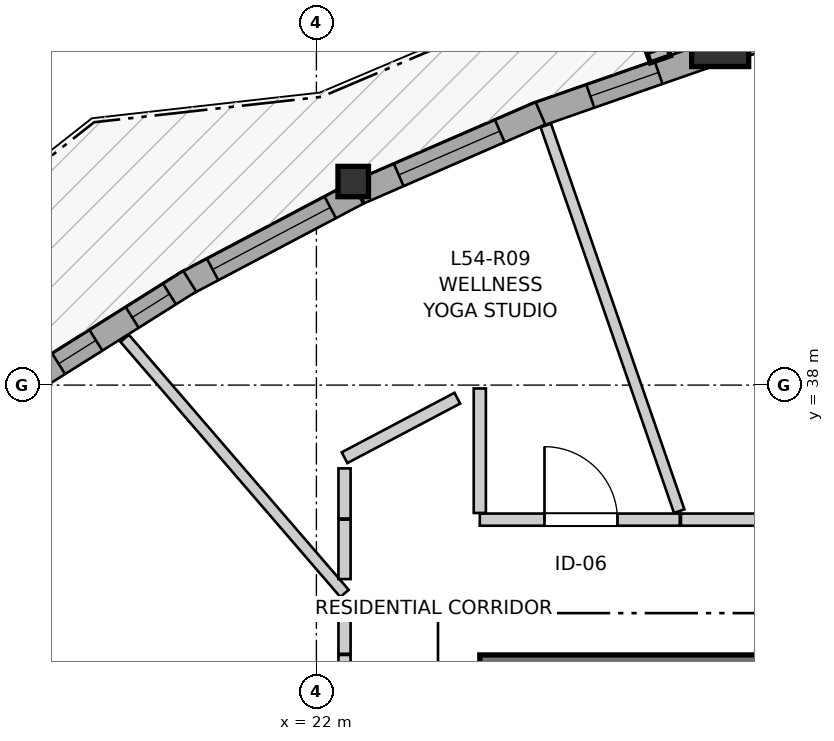
"""IFC4 building model, lengths in metres.
Left out: names, types, materials, properties, quantities, classifications, styles, units other than length and angle.
Written with IfcOpenShell. Run it as: python <this file> out.ifc"""

import sys

from ifc_helpers import new_model, si_unit, direction, frame, frame_2d, origin, origin_2d, place, context, subcontext, project, spatial, rectangle, i_section, extrude, source, transform, mapped, element, fill, save


model = new_model("IFC4")
c1 = context("Model", 3, precision=1e-05, world=origin(), true_north=direction((0.0, 1.0)))
c2 = subcontext(c1, "Body", "Model", "MODEL_VIEW")
j1 = project(units=[si_unit("LENGTHUNIT", "METRE"), si_unit("PLANEANGLEUNIT", "RADIAN")], contexts=[c1])
p1 = place(None, origin())
s1 = spatial("IfcSite", under=j1, at=p1, CompositionType="ELEMENT")
p2 = place(p1, origin())
s2 = spatial("IfcBuilding", under=s1, at=p2, CompositionType="ELEMENT")
p3 = place(p2, frame((0.0, 0.0, 181.0)))
s3 = spatial("IfcBuildingStorey", under=s2, at=p3, CompositionType="ELEMENT", Elevation=181.0)
p4 = place(p3, frame((36.55, 34.125, 0.0), z_axis=(0.0, 0.0, 1.0), x_axis=(-1.0, 0.0, 0.0)))
e1 = element("IfcWall", 1, at=p4, inside=s3, PredefinedType="SHEAR", context=c2, shape_type="SweptSolid", body=[
    extrude(rectangle(XDim=12.4, YDim=0.65, at=frame_2d((6.2, 0.0))), origin(), (0.0, 0.0, 1.0), 2.95),
])
m1 = source(origin(), c2, "Body", "SweptSolid", [
    extrude(rectangle(XDim=0.75, YDim=0.75, at=origin_2d()), origin(), (0.0, 0.0, 1.0), 2.95),
])
p5 = place(p3, frame((27.312, 42.566, 0.0), z_axis=(0.0, 0.0, 1.0), x_axis=(1.0, 0.0, 0.0)))
e2 = element("IfcColumn", 2, at=p5, inside=s3, PredefinedType="COLUMN", context=c2, shape_type="MappedRepresentation", body=[
    mapped(m1, transform((0.0, 0.0, 0.0), x_axis=(1.0, 0.0, 0.0), y_axis=(0.0, 1.0, 0.0), z_axis=(0.0, 0.0, 1.0), scale=1.0)),
])
m2 = source(origin(), c2, "Body", "SweptSolid", [
    extrude(i_section(OverallWidth=0.401, OverallDepth=0.399, WebThickness=0.023, FlangeThickness=0.036, FilletRadius=0.015, at=origin_2d()), origin(), (0.0, 0.0, 1.0), 2.95),
])
p6 = place(p3, frame((22.484, 40.678, 0.0), z_axis=(0.0, 0.0, 1.0), x_axis=(1.0, 0.0, 0.0)))
e3 = element("IfcColumn", 3, at=p6, inside=s3, PredefinedType="PILASTER", context=c2, shape_type="MappedRepresentation", body=[
    mapped(m2, transform((0.0, 0.0, 0.0), x_axis=(1.0, 0.0, 0.0), y_axis=(0.0, 1.0, 0.0), z_axis=(0.0, 0.0, 1.0), scale=1.0)),
])
p7 = place(p3, frame((29.95, 43.112, 0.0), z_axis=(0.0, 0.0, 1.0), x_axis=(-0.96543906005, -0.260628895806, 0.0)))
e4 = element("IfcWall", 4, at=p7, inside=s3, PredefinedType="SOLIDWALL", context=c2, shape_type="SweptSolid", body=[
    extrude(rectangle(XDim=2.524, YDim=0.32, at=frame_2d((1.262, 0.0))), origin(), (0.0, 0.0, 1.0), 2.53),
])
p8 = place(p7, frame((0.767, 0.0, 0.0)))
e5 = element("IfcOpeningElement", 5, at=p8, cuts=e4, PredefinedType="OPENING", context=c2, shape_type="SweptSolid", body=[
    extrude(rectangle(XDim=1.0, YDim=2.1, at=frame_2d((0.5, 1.05))), frame((0.0, 0.17, 0.0), z_axis=(0.0, -1.0, 0.0), x_axis=(1.0, 0.0, 0.0)), (0.0, 0.0, 1.0), 0.34),
])
p9 = place(p3, frame((27.209, 42.361, 0.0), z_axis=(0.0, 0.0, 1.0), x_axis=(-0.944111191945, -0.329627148829, 0.0)))
e6 = element("IfcWall", 6, at=p9, inside=s3, PredefinedType="SOLIDWALL", context=c2, shape_type="SweptSolid", body=[
    extrude(rectangle(XDim=2.481, YDim=0.32, at=frame_2d((1.241, 0.0))), origin(), (0.0, 0.0, 1.0), 2.53),
])
p10 = place(p9, frame((0.75, 0.0, 0.82)))
e7 = element("IfcOpeningElement", 7, at=p10, cuts=e6, PredefinedType="OPENING", context=c2, shape_type="SweptSolid", body=[
    extrude(rectangle(XDim=0.95, YDim=1.35, at=frame_2d((0.475, 0.675))), frame((0.0, 0.17, 0.0), z_axis=(0.0, -1.0, 0.0), x_axis=(1.0, 0.0, 0.0)), (0.0, 0.0, 1.0), 0.34),
])
p11 = place(p3, frame((24.948, 41.575, 0.0), z_axis=(0.0, 0.0, 1.0), x_axis=(-0.917095460669, -0.398667676168, 0.0)))
e8 = element("IfcWall", 8, at=p11, inside=s3, PredefinedType="SOLIDWALL", context=c2, shape_type="SweptSolid", body=[
    extrude(rectangle(XDim=2.597, YDim=0.32, at=frame_2d((1.299, 0.0))), origin(), (0.0, 0.0, 1.0), 2.53),
])
p12 = place(p11, frame((0.583, 0.0, 0.82)))
e9 = element("IfcOpeningElement", 9, at=p12, cuts=e8, PredefinedType="OPENING", context=c2, shape_type="SweptSolid", body=[
    extrude(rectangle(XDim=1.45, YDim=1.25, at=frame_2d((0.725, 0.625))), frame((0.0, 0.17, 0.0), z_axis=(0.0, -1.0, 0.0), x_axis=(1.0, 0.0, 0.0)), (0.0, 0.0, 1.0), 0.34),
])
p13 = place(p3, frame((22.542, 40.527, 0.0), z_axis=(0.0, 0.0, 1.0), x_axis=(-0.884378248125, -0.466770944087, 0.0)))
e10 = element("IfcWall", 10, at=p13, inside=s3, PredefinedType="SOLIDWALL", context=c2, shape_type="SweptSolid", body=[
    extrude(rectangle(XDim=2.582, YDim=0.32, at=frame_2d((1.291, 0.0))), origin(), (0.0, 0.0, 1.0), 2.53),
])
p14 = place(p13, frame((0.406, 0.0, 0.82)))
e11 = element("IfcOpeningElement", 11, at=p14, cuts=e10, PredefinedType="OPENING", context=c2, shape_type="SweptSolid", body=[
    extrude(rectangle(XDim=1.75, YDim=1.3, at=frame_2d((0.875, 0.65))), frame((0.0, 0.17, 0.0), z_axis=(0.0, -1.0, 0.0), x_axis=(1.0, 0.0, 0.0)), (0.0, 0.0, 1.0), 0.34),
])
p15 = place(p3, frame((20.334, 39.366, 0.0), z_axis=(0.0, 0.0, 1.0), x_axis=(-0.84643016858, -0.532499736825, 0.0)))
e12 = element("IfcWall", 12, at=p15, inside=s3, PredefinedType="SOLIDWALL", context=c2, shape_type="SweptSolid", body=[
    extrude(rectangle(XDim=2.437, YDim=0.32, at=frame_2d((1.219, 0.0))), origin(), (0.0, 0.0, 1.0), 2.53),
])
p16 = place(p15, frame((0.315, 0.0, 0.82)))
e13 = element("IfcOpeningElement", 13, at=p16, cuts=e12, PredefinedType="OPENING", context=c2, shape_type="SweptSolid", body=[
    extrude(rectangle(XDim=0.58, YDim=1.35, at=frame_2d((0.29, 0.675))), frame((0.0, 0.17, 0.0), z_axis=(0.0, -1.0, 0.0), x_axis=(1.0, 0.0, 0.0)), (0.0, 0.0, 1.0), 0.34),
])
p17 = place(p15, frame((1.458, 0.0, 0.82)))
e14 = element("IfcOpeningElement", 14, at=p17, cuts=e12, PredefinedType="OPENING", context=c2, shape_type="SweptSolid", body=[
    extrude(rectangle(XDim=0.58, YDim=1.35, at=frame_2d((0.29, 0.675))), frame((0.0, 0.17, 0.0), z_axis=(0.0, -1.0, 0.0), x_axis=(1.0, 0.0, 0.0)), (0.0, 0.0, 1.0), 0.34),
])
p18 = place(p3, frame((22.37, 27.85, 0.0), z_axis=(0.0, 0.0, 1.0), x_axis=(0.0, 1.0, 0.0)))
e15 = element("IfcWall", 15, at=p18, inside=s3, PredefinedType="PARTITIONING", context=c2, shape_type="SweptSolid", body=[
    extrude(rectangle(XDim=6.6, YDim=0.16, at=frame_2d((3.3, 0.0))), origin(), (0.0, 0.0, 1.0), 2.95),
])
p19 = place(p18, frame((2.981, 0.0, 0.0)))
e16 = element("IfcOpeningElement", 16, at=p19, cuts=e15, PredefinedType="OPENING", context=c2, shape_type="SweptSolid", body=[
    extrude(rectangle(XDim=1.3, YDim=2.1, at=frame_2d((0.65, 1.05))), frame((0.0, 0.09, 0.0), z_axis=(0.0, -1.0, 0.0), x_axis=(1.0, 0.0, 0.0)), (0.0, 0.0, 1.0), 0.18),
])
p20 = place(p3, frame((26.796, 36.23, 0.0), z_axis=(0.0, 0.0, 1.0), x_axis=(1.0, 0.0, 0.0)))
e17 = element("IfcWall", 17, at=p20, inside=s3, PredefinedType="PARTITIONING", context=c2, shape_type="SweptSolid", body=[
    extrude(rectangle(XDim=5.371, YDim=0.16, at=frame_2d((2.686, 0.0))), origin(), (0.0, 0.0, 1.0), 2.95),
])
p21 = place(p20, frame((2.036, 0.0, 0.0)))
e18 = element("IfcOpeningElement", 18, at=p21, cuts=e17, PredefinedType="OPENING", context=c2, shape_type="SweptSolid", body=[
    extrude(rectangle(XDim=1.3, YDim=2.1, at=frame_2d((0.65, 1.05))), frame((0.0, 0.09, 0.0), z_axis=(0.0, -1.0, 0.0), x_axis=(1.0, 0.0, 0.0)), (0.0, 0.0, 1.0), 0.18),
])
p22 = place(p3, frame((24.15, 36.23, 0.0), z_axis=(0.0, 0.0, 1.0), x_axis=(1.0, 0.0, 0.0)))
e19 = element("IfcWall", 19, at=p22, inside=s3, PredefinedType="PARTITIONING", context=c2, shape_type="SweptSolid", body=[
    extrude(rectangle(XDim=2.631, YDim=0.16, at=frame_2d((1.315, 0.0))), origin(), (0.0, 0.0, 1.0), 2.95),
])
p23 = place(p22, frame((0.851, 0.0, 0.0)))
e20 = element("IfcOpeningElement", 20, at=p23, cuts=e19, PredefinedType="OPENING", context=c2, shape_type="SweptSolid", body=[
    extrude(rectangle(XDim=0.96, YDim=2.1, at=frame_2d((0.48, 1.05))), frame((0.0, 0.09, 0.0), z_axis=(0.0, -1.0, 0.0), x_axis=(1.0, 0.0, 0.0)), (0.0, 0.0, 1.0), 0.18),
])
p24 = place(p3, frame((25.019, 41.416, 0.0), z_axis=(0.0, 0.0, 1.0), x_axis=(0.326820085254, -0.945086573746, 0.0)))
e21 = element("IfcWall", 21, at=p24, inside=s3, PredefinedType="PARTITIONING", context=c2, shape_type="SweptSolid", body=[
    extrude(rectangle(XDim=5.37, YDim=0.145, at=frame_2d((2.685, 0.0))), origin(), (0.0, 0.0, 1.0), 2.95),
])
p25 = place(p3, frame((19.477, 38.616, 0.0), z_axis=(0.0, 0.0, 1.0), x_axis=(0.652826266908, -0.757507666783, 0.0)))
e22 = element("IfcWall", 22, at=p25, inside=s3, PredefinedType="PARTITIONING", context=c2, shape_type="SweptSolid", body=[
    extrude(rectangle(XDim=4.431, YDim=0.145, at=frame_2d((2.216, 0.0))), origin(), (0.0, 0.0, 1.0), 2.95),
])
p26 = place(p3, frame((24.15, 36.318, 0.0), z_axis=(0.0, 0.0, 1.0), x_axis=(0.0, 1.0, 0.0)))
e23 = element("IfcWall", 23, at=p26, inside=s3, PredefinedType="PARTITIONING", context=c2, shape_type="SweptSolid", body=[
    extrude(rectangle(XDim=1.638, YDim=0.16, at=frame_2d((0.819, 0.0))), origin(), (0.0, 0.0, 1.0), 2.95),
])
p27 = place(p3, frame((22.37, 37.045, 0.0), z_axis=(0.0, 0.0, 1.0), x_axis=(0.884434803915, 0.466663773635, 0.0)))
e24 = element("IfcWall", 24, at=p27, inside=s3, PredefinedType="PARTITIONING", context=c2, shape_type="SweptSolid", body=[
    extrude(rectangle(XDim=1.678, YDim=0.16, at=frame_2d((0.839, 0.0))), origin(), (0.0, 0.0, 1.0), 2.558),
])
p28 = place(p3, frame((22.37, 35.448, 0.0), z_axis=(0.0, 0.0, 1.0), x_axis=(0.0, 1.0, 0.0)))
e25 = element("IfcWall", 25, at=p28, inside=s3, PredefinedType="PARTITIONING", context=c2, shape_type="SweptSolid", body=[
    extrude(rectangle(XDim=0.782, YDim=0.16, at=frame_2d((0.391, 0.0))), origin(), (0.0, 0.0, 1.0), 2.95),
])
p29 = place(p3, frame((22.37, 36.245, 0.0), z_axis=(0.0, 0.0, 1.0), x_axis=(0.0, 1.0, 0.0)))
e26 = element("IfcWall", 26, at=p29, inside=s3, PredefinedType="PARTITIONING", context=c2, shape_type="SweptSolid", body=[
    extrude(rectangle(XDim=0.659, YDim=0.16, at=frame_2d((0.33, 0.0))), origin(), (0.0, 0.0, 1.0), 2.95),
])
p30 = place(p3, frame((22.37, 34.465, 0.0), z_axis=(0.0, 0.0, 1.0), x_axis=(0.0, 1.0, 0.0)))
e27 = element("IfcWall", 27, at=p30, inside=s3, PredefinedType="PARTITIONING", context=c2, shape_type="SweptSolid", body=[
    extrude(rectangle(XDim=0.544, YDim=0.16, at=frame_2d((0.272, 0.0))), origin(), (0.0, 0.0, 1.0), 2.95),
])
m3 = source(origin(), c2, "Body", "SweptSolid", [
    extrude(rectangle(XDim=0.95, YDim=1.35, at=frame_2d((0.475, 0.675))), frame((0.0, 0.03, 0.0), z_axis=(0.0, -1.0, 0.0), x_axis=(1.0, 0.0, 0.0)), (0.0, 0.0, 1.0), 0.06),
])
p31 = place(p10, origin())
e28 = element("IfcWindow", 28, at=p31, inside=s3, PartitioningType="SINGLE_PANEL", PredefinedType="WINDOW", context=c2, shape_type="MappedRepresentation", body=[
    mapped(m3, transform((0.0, 0.0, 0.0), x_axis=(1.0, 0.0, 0.0), y_axis=(0.0, 1.0, 0.0), z_axis=(0.0, 0.0, 1.0), scale=1.0)),
])
fill(e7, e28)
m4 = source(origin(), c2, "Body", "SweptSolid", [
    extrude(rectangle(XDim=1.45, YDim=1.25, at=frame_2d((0.725, 0.625))), frame((0.0, 0.03, 0.0), z_axis=(0.0, -1.0, 0.0), x_axis=(1.0, 0.0, 0.0)), (0.0, 0.0, 1.0), 0.06),
])
p32 = place(p12, origin())
e29 = element("IfcWindow", 29, at=p32, inside=s3, PartitioningType="SINGLE_PANEL", PredefinedType="WINDOW", context=c2, shape_type="MappedRepresentation", body=[
    mapped(m4, transform((0.0, 0.0, 0.0), x_axis=(1.0, 0.0, 0.0), y_axis=(0.0, 1.0, 0.0), z_axis=(0.0, 0.0, 1.0), scale=1.0)),
])
fill(e9, e29)
m5 = source(origin(), c2, "Body", "SweptSolid", [
    extrude(rectangle(XDim=1.75, YDim=1.3, at=frame_2d((0.875, 0.65))), frame((0.0, 0.03, 0.0), z_axis=(0.0, -1.0, 0.0), x_axis=(1.0, 0.0, 0.0)), (0.0, 0.0, 1.0), 0.06),
])
p33 = place(p14, origin())
e30 = element("IfcWindow", 30, at=p33, inside=s3, PartitioningType="SINGLE_PANEL", PredefinedType="WINDOW", context=c2, shape_type="MappedRepresentation", body=[
    mapped(m5, transform((0.0, 0.0, 0.0), x_axis=(1.0, 0.0, 0.0), y_axis=(0.0, 1.0, 0.0), z_axis=(0.0, 0.0, 1.0), scale=1.0)),
])
fill(e11, e30)
m6 = source(origin(), c2, "Body", "SweptSolid", [
    extrude(rectangle(XDim=0.58, YDim=1.35, at=frame_2d((0.29, 0.675))), frame((0.0, 0.03, 0.0), z_axis=(0.0, -1.0, 0.0), x_axis=(1.0, 0.0, 0.0)), (0.0, 0.0, 1.0), 0.06),
])
p34 = place(p16, origin())
e31 = element("IfcWindow", 31, at=p34, inside=s3, PartitioningType="SINGLE_PANEL", PredefinedType="WINDOW", context=c2, shape_type="MappedRepresentation", body=[
    mapped(m6, transform((0.0, 0.0, 0.0), x_axis=(1.0, 0.0, 0.0), y_axis=(0.0, 1.0, 0.0), z_axis=(0.0, 0.0, 1.0), scale=1.0)),
])
fill(e13, e31)
p35 = place(p17, origin())
e32 = element("IfcWindow", 32, at=p35, inside=s3, PartitioningType="SINGLE_PANEL", PredefinedType="WINDOW", context=c2, shape_type="MappedRepresentation", body=[
    mapped(m6, transform((0.0, 0.0, 0.0), x_axis=(1.0, 0.0, 0.0), y_axis=(0.0, 1.0, 0.0), z_axis=(0.0, 0.0, 1.0), scale=1.0)),
])
fill(e14, e32)
m7 = source(origin(), c2, "Body", "SweptSolid", [
    extrude(rectangle(XDim=0.96, YDim=2.1, at=frame_2d((0.48, 1.05))), frame((0.0, 0.025, 0.0), z_axis=(0.0, -1.0, 0.0), x_axis=(1.0, 0.0, 0.0)), (0.0, 0.0, 1.0), 0.05),
])
p36 = place(p23, origin())
e33 = element("IfcDoor", 33, at=p36, inside=s3, OperationType="SINGLE_SWING_LEFT", PredefinedType="DOOR", context=c2, shape_type="MappedRepresentation", body=[
    mapped(m7, transform((0.0, 0.0, 0.0), x_axis=(1.0, 0.0, 0.0), y_axis=(0.0, 1.0, 0.0), z_axis=(0.0, 0.0, 1.0), scale=1.0)),
])
fill(e20, e33)
save(model, sys.argv[1])
